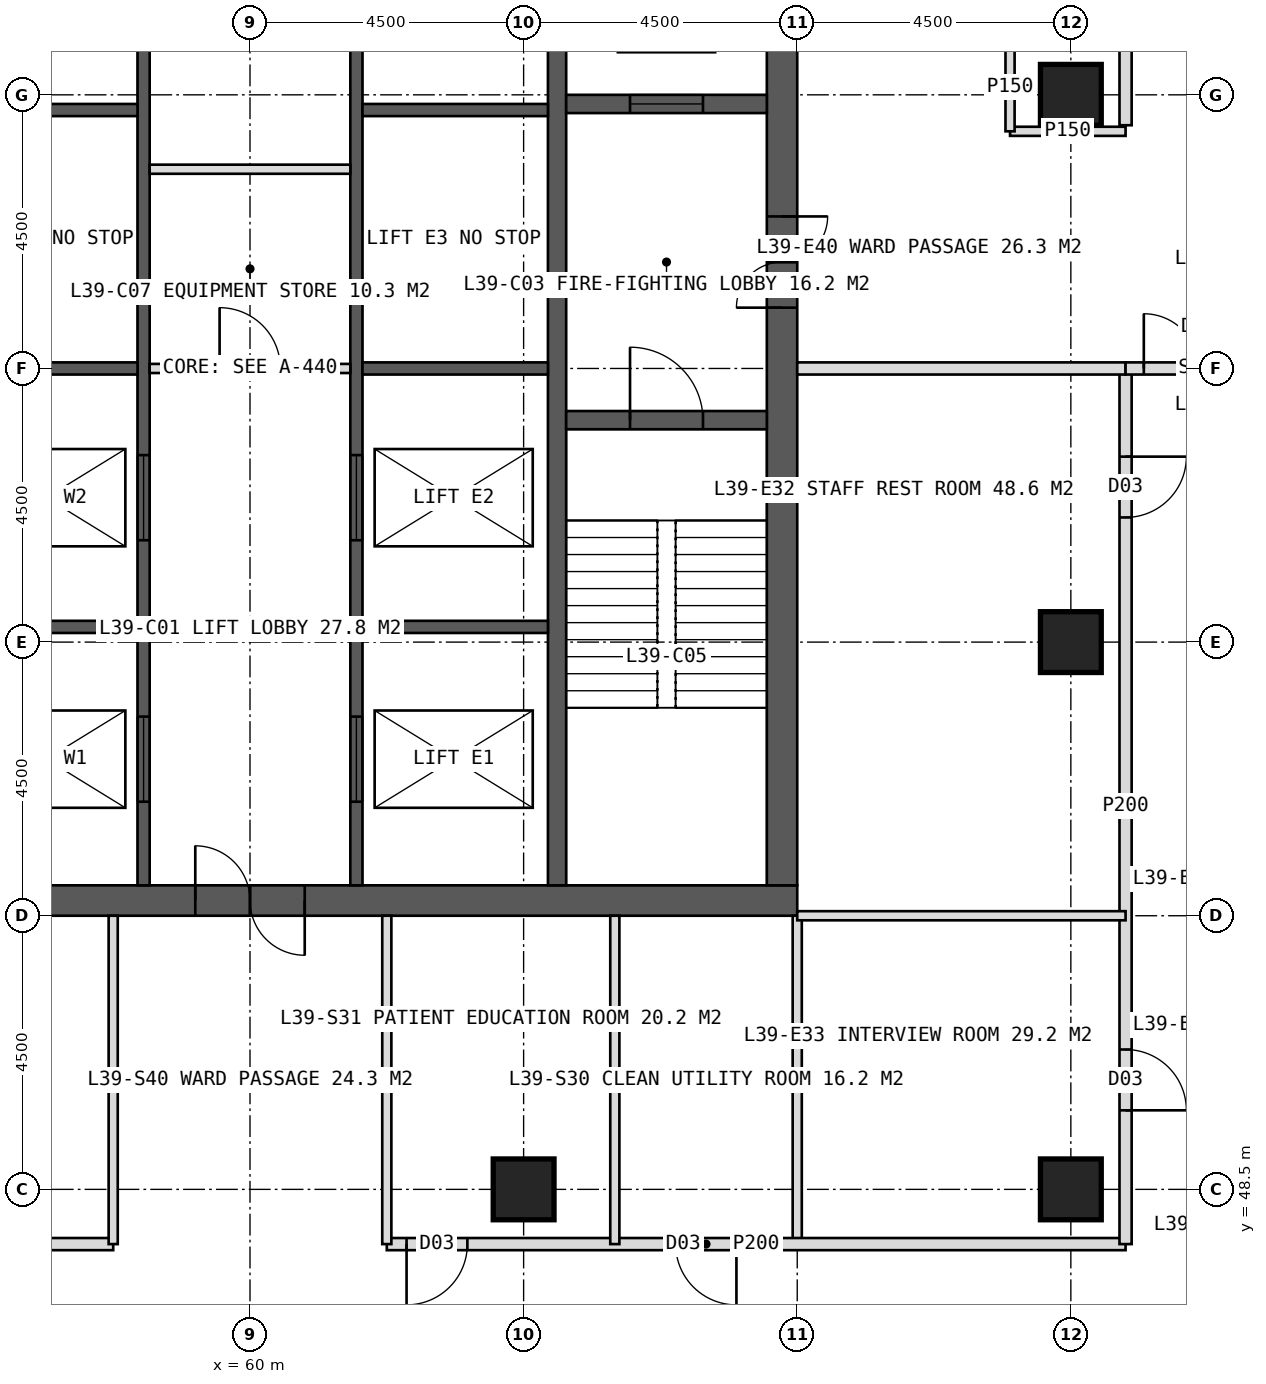
"""IFC4 building model, lengths in metres.
Left out: names, types, materials, properties, quantities, classifications, styles, units other than length and angle.
Written with IfcOpenShell. Run it as: python <this file> out.ifc"""

import sys

from ifc_helpers import new_model, si_unit, direction, frame, frame_2d, origin, origin_2d, place, context, subcontext, project, spatial, rectangle, hollow_rectangle, extrude, element, fill, save


model = new_model("IFC4")
c1 = context("Model", 3, precision=1e-05, world=origin(), true_north=direction((0.0, 1.0)))
c2 = subcontext(c1, "Body", "Model", "MODEL_VIEW")
j1 = project(units=[si_unit("LENGTHUNIT", "METRE"), si_unit("PLANEANGLEUNIT", "RADIAN")], contexts=[c1])
p1 = place(None, origin())
s1 = spatial("IfcSite", under=j1, at=p1, CompositionType="ELEMENT")
p2 = place(p1, origin())
s2 = spatial("IfcBuilding", under=s1, at=p2, CompositionType="ELEMENT")
p3 = place(p2, frame((0.0, 0.0, 164.0)))
s3 = spatial("IfcBuildingStorey", under=s2, at=p3, CompositionType="ELEMENT", Elevation=164.0)
p4 = place(p3, frame((51.0, 53.25, 0.0), z_axis=(0.0, 0.0, 1.0), x_axis=(1.0, 0.0, 0.0)))
e1 = element("IfcWall", 1, at=p4, inside=s3, PredefinedType="SHEAR", context=c2, shape_type="SweptSolid", body=[
    extrude(rectangle(XDim=18.0, YDim=0.5, at=frame_2d((9.0, 0.0))), origin(), (0.0, 0.0, 1.0), 4.0),
])
p5 = place(p4, frame((8.1, 0.0, 0.0)))
e2 = element("IfcOpeningElement", 2, at=p5, cuts=e1, PredefinedType="OPENING", context=c2, shape_type="SweptSolid", body=[
    extrude(rectangle(XDim=1.8, YDim=2.2, at=frame_2d((0.9, 1.1))), frame((0.0, 0.26, 0.0), z_axis=(0.0, -1.0, 0.0), x_axis=(1.0, 0.0, 0.0)), (0.0, 0.0, 1.0), 0.52),
])
p6 = place(p3, frame((68.75, 53.5, 0.0), z_axis=(0.0, 0.0, 1.0), x_axis=(0.0, 1.0, 0.0)))
e3 = element("IfcWall", 3, at=p6, inside=s3, PredefinedType="SHEAR", context=c2, shape_type="SweptSolid", body=[
    extrude(rectangle(XDim=17.0, YDim=0.5, at=frame_2d((8.5, 0.0))), origin(), (0.0, 0.0, 1.0), 4.0),
])
p7 = place(p6, frame((9.5, 0.0, 0.0)))
e4 = element("IfcOpeningElement", 4, at=p7, cuts=e3, PredefinedType="OPENING", context=c2, shape_type="SweptSolid", body=[
    extrude(rectangle(XDim=1.5, YDim=2.2, at=frame_2d((0.75, 1.1))), frame((0.0, 0.26, 0.0), z_axis=(0.0, -1.0, 0.0), x_axis=(1.0, 0.0, 0.0)), (0.0, 0.0, 1.0), 0.52),
])
p8 = place(p3, frame((65.05, 53.5, 0.0), z_axis=(0.0, 0.0, 1.0), x_axis=(0.0, 1.0, 0.0)))
e5 = element("IfcWall", 5, at=p8, inside=s3, PredefinedType="SHEAR", context=c2, shape_type="SweptSolid", body=[
    extrude(rectangle(XDim=17.0, YDim=0.3, at=frame_2d((8.5, 0.0))), origin(), (0.0, 0.0, 1.0), 4.0),
])
p9 = place(p3, frame((58.25, 53.5, 0.0), z_axis=(0.0, 0.0, 1.0), x_axis=(0.0, 1.0, 0.0)))
e6 = element("IfcWall", 6, at=p9, inside=s3, PredefinedType="SHEAR", context=c2, shape_type="SweptSolid", body=[
    extrude(rectangle(XDim=17.0, YDim=0.2, at=frame_2d((8.5, 0.0))), origin(), (0.0, 0.0, 1.0), 4.0),
])
p10 = place(p9, frame((1.375, 0.0, 0.0)))
e7 = element("IfcOpeningElement", 7, at=p10, cuts=e6, PredefinedType="OPENING", context=c2, shape_type="SweptSolid", body=[
    extrude(rectangle(XDim=1.4, YDim=2.2, at=frame_2d((0.7, 1.1))), frame((0.0, 0.11, 0.0), z_axis=(0.0, -1.0, 0.0), x_axis=(1.0, 0.0, 0.0)), (0.0, 0.0, 1.0), 0.22),
])
p11 = place(p9, frame((5.675, 0.0, 0.0)))
e8 = element("IfcOpeningElement", 8, at=p11, cuts=e6, PredefinedType="OPENING", context=c2, shape_type="SweptSolid", body=[
    extrude(rectangle(XDim=1.4, YDim=2.2, at=frame_2d((0.7, 1.1))), frame((0.0, 0.11, 0.0), z_axis=(0.0, -1.0, 0.0), x_axis=(1.0, 0.0, 0.0)), (0.0, 0.0, 1.0), 0.22),
])
p12 = place(p3, frame((61.75, 53.5, 0.0), z_axis=(0.0, 0.0, 1.0), x_axis=(0.0, 1.0, 0.0)))
e9 = element("IfcWall", 9, at=p12, inside=s3, PredefinedType="SHEAR", context=c2, shape_type="SweptSolid", body=[
    extrude(rectangle(XDim=17.0, YDim=0.2, at=frame_2d((8.5, 0.0))), origin(), (0.0, 0.0, 1.0), 4.0),
])
p13 = place(p12, frame((1.375, 0.0, 0.0)))
e10 = element("IfcOpeningElement", 10, at=p13, cuts=e9, PredefinedType="OPENING", context=c2, shape_type="SweptSolid", body=[
    extrude(rectangle(XDim=1.4, YDim=2.2, at=frame_2d((0.7, 1.1))), frame((0.0, 0.11, 0.0), z_axis=(0.0, -1.0, 0.0), x_axis=(1.0, 0.0, 0.0)), (0.0, 0.0, 1.0), 0.22),
])
p14 = place(p12, frame((5.675, 0.0, 0.0)))
e11 = element("IfcOpeningElement", 11, at=p14, cuts=e9, PredefinedType="OPENING", context=c2, shape_type="SweptSolid", body=[
    extrude(rectangle(XDim=1.4, YDim=2.2, at=frame_2d((0.7, 1.1))), frame((0.0, 0.11, 0.0), z_axis=(0.0, -1.0, 0.0), x_axis=(1.0, 0.0, 0.0)), (0.0, 0.0, 1.0), 0.22),
])
for number, where, z_axis, x_axis in (
    (12, (55.1, 57.75, 0.0), (0.0, 0.0, 1.0), (1.0, 0.0, 0.0)),
    (13, (61.85, 57.75, 0.0), (0.0, 0.0, 1.0), (1.0, 0.0, 0.0)),
    (14, (55.1, 62.0, 0.0), (0.0, 0.0, 1.0), (1.0, 0.0, 0.0)),
    (15, (61.85, 62.0, 0.0), (0.0, 0.0, 1.0), (1.0, 0.0, 0.0)),
    (16, (55.1, 66.25, 0.0), (0.0, 0.0, 1.0), (1.0, 0.0, 0.0)),
    (17, (61.85, 66.25, 0.0), (0.0, 0.0, 1.0), (1.0, 0.0, 0.0)),
):
    element("IfcWall", number, at=place(p3, frame(where, z_axis=z_axis, x_axis=x_axis)), inside=s3, PredefinedType="SHEAR", context=c2, shape_type="SweptSolid", body=[
        extrude(rectangle(XDim=3.05, YDim=0.2, at=frame_2d((1.525, 0.0))), origin(), (0.0, 0.0, 1.0), 4.0),
    ])
p15 = place(p3, frame((65.2, 61.15, 0.0), z_axis=(0.0, 0.0, 1.0), x_axis=(1.0, 0.0, 0.0)))
e18 = element("IfcWall", 18, at=p15, inside=s3, PredefinedType="SHEAR", context=c2, shape_type="SweptSolid", body=[
    extrude(rectangle(XDim=3.3, YDim=0.3, at=frame_2d((1.65, 0.0))), origin(), (0.0, 0.0, 1.0), 4.0),
])
p16 = place(p15, frame((1.05, 0.0, 0.0)))
e19 = element("IfcOpeningElement", 19, at=p16, cuts=e18, PredefinedType="OPENING", context=c2, shape_type="SweptSolid", body=[
    extrude(rectangle(XDim=1.2, YDim=2.1, at=frame_2d((0.6, 1.05))), frame((0.0, 0.16, 0.0), z_axis=(0.0, -1.0, 0.0), x_axis=(1.0, 0.0, 0.0)), (0.0, 0.0, 1.0), 0.32),
])
p17 = place(p3, frame((65.2, 66.35, 0.0), z_axis=(0.0, 0.0, 1.0), x_axis=(1.0, 0.0, 0.0)))
e20 = element("IfcWall", 20, at=p17, inside=s3, PredefinedType="SHEAR", context=c2, shape_type="SweptSolid", body=[
    extrude(rectangle(XDim=3.3, YDim=0.3, at=frame_2d((1.65, 0.0))), origin(), (0.0, 0.0, 1.0), 4.0),
])
p18 = place(p17, frame((1.05, 0.0, 0.0)))
e21 = element("IfcOpeningElement", 21, at=p18, cuts=e20, PredefinedType="OPENING", context=c2, shape_type="SweptSolid", body=[
    extrude(rectangle(XDim=1.2, YDim=2.2, at=frame_2d((0.6, 1.1))), frame((0.0, 0.16, 0.0), z_axis=(0.0, -1.0, 0.0), x_axis=(1.0, 0.0, 0.0)), (0.0, 0.0, 1.0), 0.32),
])
for number, where, z_axis, x_axis in (
    (22, (73.5, 48.5, 0.0), (0.0, 0.0, 1.0), (1.0, 0.0, 0.0)),
    (23, (64.5, 48.5, 0.0), (0.0, 0.0, 1.0), (1.0, 0.0, 0.0)),
    (24, (73.5, 57.5, 0.0), (0.0, 0.0, 1.0), (1.0, 0.0, 0.0)),
    (25, (73.5, 66.5, 0.0), (0.0, 0.0, 1.0), (1.0, 0.0, 0.0)),
):
    element("IfcColumn", number, at=place(p3, frame(where, z_axis=z_axis, x_axis=x_axis)), inside=s3, PredefinedType="COLUMN", context=c2, shape_type="SweptSolid", body=[
        extrude(hollow_rectangle(XDim=1.0, YDim=1.0, WallThickness=0.1, at=origin_2d()), origin(), (0.0, 0.0, 1.0), 4.0),
    ])
p19 = place(p3, frame((69.0, 53.0, 0.0), z_axis=(0.0, 0.0, 1.0), x_axis=(0.0, -1.0, 0.0)))
e26 = element("IfcWall", 26, at=p19, inside=s3, PredefinedType="PARTITIONING", context=c2, shape_type="SweptSolid", body=[
    extrude(rectangle(XDim=5.4, YDim=0.15, at=frame_2d((2.7, 0.0))), origin(), (0.0, 0.0, 1.0), 3.75),
])
p20 = place(p3, frame((74.4, 47.6, 0.0), z_axis=(0.0, 0.0, 1.0), x_axis=(-1.0, 0.0, 0.0)))
e27 = element("IfcWall", 27, at=p20, inside=s3, PredefinedType="PARTITIONING", context=c2, shape_type="SweptSolid", body=[
    extrude(rectangle(XDim=12.15, YDim=0.2, at=frame_2d((6.075, 0.0))), origin(), (0.0, 0.0, 1.0), 3.75),
])
p21 = place(p20, frame((6.4, 0.0, 0.0)))
e28 = element("IfcOpeningElement", 28, at=p21, cuts=e27, PredefinedType="OPENING", context=c2, shape_type="SweptSolid", body=[
    extrude(rectangle(XDim=1.0, YDim=2.1, at=frame_2d((0.5, 1.05))), frame((0.0, 0.11, 0.0), z_axis=(0.0, -1.0, 0.0), x_axis=(1.0, 0.0, 0.0)), (0.0, 0.0, 1.0), 0.22),
])
p22 = place(p20, frame((10.825, 0.0, 0.0)))
e29 = element("IfcOpeningElement", 29, at=p22, cuts=e27, PredefinedType="OPENING", context=c2, shape_type="SweptSolid", body=[
    extrude(rectangle(XDim=1.0, YDim=2.1, at=frame_2d((0.5, 1.05))), frame((0.0, 0.11, 0.0), z_axis=(0.0, -1.0, 0.0), x_axis=(1.0, 0.0, 0.0)), (0.0, 0.0, 1.0), 0.22),
])
p23 = place(p3, frame((57.75, 47.6, 0.0), z_axis=(0.0, 0.0, 1.0), x_axis=(-1.0, 0.0, 0.0)))
e30 = element("IfcWall", 30, at=p23, inside=s3, PredefinedType="PARTITIONING", context=c2, shape_type="SweptSolid", body=[
    extrude(rectangle(XDim=12.15, YDim=0.2, at=frame_2d((6.075, 0.0))), origin(), (0.0, 0.0, 1.0), 3.75),
])
p24 = place(p23, frame((4.3, 0.0, 0.0)))
e31 = element("IfcOpeningElement", 31, at=p24, cuts=e30, PredefinedType="OPENING", context=c2, shape_type="SweptSolid", body=[
    extrude(rectangle(XDim=1.0, YDim=2.1, at=frame_2d((0.5, 1.05))), frame((0.0, 0.11, 0.0), z_axis=(0.0, -1.0, 0.0), x_axis=(1.0, 0.0, 0.0)), (0.0, 0.0, 1.0), 0.22),
])
p25 = place(p23, frame((8.95, 0.0, 0.0)))
e32 = element("IfcOpeningElement", 32, at=p25, cuts=e30, PredefinedType="OPENING", context=c2, shape_type="SweptSolid", body=[
    extrude(rectangle(XDim=1.0, YDim=2.1, at=frame_2d((0.5, 1.05))), frame((0.0, 0.11, 0.0), z_axis=(0.0, -1.0, 0.0), x_axis=(1.0, 0.0, 0.0)), (0.0, 0.0, 1.0), 0.22),
])
for number, where, z_axis, x_axis in (
    (33, (62.25, 53.0, 0.0), (0.0, 0.0, 1.0), (0.0, -1.0, 0.0)),
    (34, (57.75, 53.0, 0.0), (0.0, 0.0, 1.0), (0.0, -1.0, 0.0)),
    (35, (66.0, 53.0, 0.0), (0.0, 0.0, 1.0), (0.0, -1.0, 0.0)),
):
    element("IfcWall", number, at=place(p3, frame(where, z_axis=z_axis, x_axis=x_axis)), inside=s3, PredefinedType="PARTITIONING", context=c2, shape_type="SweptSolid", body=[
        extrude(rectangle(XDim=5.4, YDim=0.15, at=frame_2d((2.7, 0.0))), origin(), (0.0, 0.0, 1.0), 3.75),
    ])
p26 = place(p3, frame((74.4, 76.4, 0.0), z_axis=(0.0, 0.0, 1.0), x_axis=(0.0, -1.0, 0.0)))
e36 = element("IfcWall", 36, at=p26, inside=s3, PredefinedType="PARTITIONING", context=c2, shape_type="SweptSolid", body=[
    extrude(rectangle(XDim=10.4, YDim=0.2, at=frame_2d((5.2, 0.0))), origin(), (0.0, 0.0, 1.0), 3.75),
])
p27 = place(p26, frame((1.35, 0.0, 0.0)))
e37 = element("IfcOpeningElement", 37, at=p27, cuts=e36, PredefinedType="OPENING", context=c2, shape_type="SweptSolid", body=[
    extrude(rectangle(XDim=1.0, YDim=2.1, at=frame_2d((0.5, 1.05))), frame((0.0, 0.11, 0.0), z_axis=(0.0, -1.0, 0.0), x_axis=(1.0, 0.0, 0.0)), (0.0, 0.0, 1.0), 0.22),
])
p28 = place(p26, frame((8.15, 0.0, 0.0)))
e38 = element("IfcOpeningElement", 38, at=p28, cuts=e36, PredefinedType="OPENING", context=c2, shape_type="SweptSolid", body=[
    extrude(rectangle(XDim=0.9, YDim=2.1, at=frame_2d((0.45, 1.05))), frame((0.0, 0.11, 0.0), z_axis=(0.0, -1.0, 0.0), x_axis=(1.0, 0.0, 0.0)), (0.0, 0.0, 1.0), 0.22),
])
p29 = place(p3, frame((74.4, 62.0, 0.0), z_axis=(0.0, 0.0, 1.0), x_axis=(0.0, -1.0, 0.0)))
e39 = element("IfcWall", 39, at=p29, inside=s3, PredefinedType="PARTITIONING", context=c2, shape_type="SweptSolid", body=[
    extrude(rectangle(XDim=14.4, YDim=0.2, at=frame_2d((7.2, 0.0))), origin(), (0.0, 0.0, 1.0), 3.75),
])
p30 = place(p29, frame((1.45, 0.0, 0.0)))
e40 = element("IfcOpeningElement", 40, at=p30, cuts=e39, PredefinedType="OPENING", context=c2, shape_type="SweptSolid", body=[
    extrude(rectangle(XDim=1.0, YDim=2.1, at=frame_2d((0.5, 1.05))), frame((0.0, 0.11, 0.0), z_axis=(0.0, -1.0, 0.0), x_axis=(1.0, 0.0, 0.0)), (0.0, 0.0, 1.0), 0.22),
])
p31 = place(p29, frame((11.2, 0.0, 0.0)))
e41 = element("IfcOpeningElement", 41, at=p31, cuts=e39, PredefinedType="OPENING", context=c2, shape_type="SweptSolid", body=[
    extrude(rectangle(XDim=1.0, YDim=2.1, at=frame_2d((0.5, 1.05))), frame((0.0, 0.11, 0.0), z_axis=(0.0, -1.0, 0.0), x_axis=(1.0, 0.0, 0.0)), (0.0, 0.0, 1.0), 0.22),
])
p32 = place(p3, frame((72.5, 65.9, 0.0), z_axis=(0.0, 0.0, 1.0), x_axis=(1.0, 0.0, 0.0)))
e42 = element("IfcWall", 42, at=p32, inside=s3, PredefinedType="PARTITIONING", context=c2, shape_type="SweptSolid", body=[
    extrude(rectangle(XDim=1.9, YDim=0.15, at=frame_2d((0.95, 0.0))), origin(), (0.0, 0.0, 1.0), 3.75),
])
p33 = place(p3, frame((69.0, 62.0, 0.0), z_axis=(0.0, 0.0, 1.0), x_axis=(1.0, 0.0, 0.0)))
e43 = element("IfcWall", 43, at=p33, inside=s3, PredefinedType="SOLIDWALL", context=c2, shape_type="SweptSolid", body=[
    extrude(rectangle(XDim=5.4, YDim=0.2, at=frame_2d((2.7, 0.0))), origin(), (0.0, 0.0, 1.0), 2.95),
])
p34 = place(p3, frame((69.0, 53.0, 0.0), z_axis=(0.0, 0.0, 1.0), x_axis=(1.0, 0.0, 0.0)))
e44 = element("IfcWall", 44, at=p34, inside=s3, PredefinedType="PARTITIONING", context=c2, shape_type="SweptSolid", body=[
    extrude(rectangle(XDim=5.4, YDim=0.15, at=frame_2d((2.7, 0.0))), origin(), (0.0, 0.0, 1.0), 3.75),
])
p35 = place(p3, frame((74.4, 62.0, 0.0), z_axis=(0.0, 0.0, 1.0), x_axis=(1.0, 0.0, 0.0)))
e45 = element("IfcWall", 45, at=p35, inside=s3, PredefinedType="SOLIDWALL", context=c2, shape_type="SweptSolid", body=[
    extrude(rectangle(XDim=2.7, YDim=0.2, at=frame_2d((1.35, 0.0))), origin(), (0.0, 0.0, 1.0), 2.95),
])
p36 = place(p35, frame((0.3, 0.0, 0.0)))
e46 = element("IfcOpeningElement", 46, at=p36, cuts=e45, PredefinedType="OPENING", context=c2, shape_type="SweptSolid", body=[
    extrude(rectangle(XDim=1.8, YDim=2.2, at=frame_2d((0.9, 1.1))), frame((0.0, 0.11, 0.0), z_axis=(0.0, -1.0, 0.0), x_axis=(1.0, 0.0, 0.0)), (0.0, 0.0, 1.0), 0.22),
])
p37 = place(p3, frame((58.35, 62.0, 0.0), z_axis=(0.0, 0.0, 1.0), x_axis=(1.0, 0.0, 0.0)))
e47 = element("IfcWall", 47, at=p37, inside=s3, PredefinedType="PARTITIONING", context=c2, shape_type="SweptSolid", body=[
    extrude(rectangle(XDim=3.3, YDim=0.15, at=frame_2d((1.65, 0.0))), origin(), (0.0, 0.0, 1.0), 3.75),
])
p38 = place(p37, frame((1.15, 0.0, 0.0)))
e48 = element("IfcOpeningElement", 48, at=p38, cuts=e47, PredefinedType="OPENING", context=c2, shape_type="SweptSolid", body=[
    extrude(rectangle(XDim=1.0, YDim=2.1, at=frame_2d((0.5, 1.05))), frame((0.0, 0.085, 0.0), z_axis=(0.0, -1.0, 0.0), x_axis=(1.0, 0.0, 0.0)), (0.0, 0.0, 1.0), 0.17),
])
p39 = place(p3, frame((58.35, 65.277, 0.0), z_axis=(0.0, 0.0, 1.0), x_axis=(1.0, 0.0, 0.0)))
e49 = element("IfcWall", 49, at=p39, inside=s3, PredefinedType="PARTITIONING", context=c2, shape_type="SweptSolid", body=[
    extrude(rectangle(XDim=3.3, YDim=0.15, at=frame_2d((1.65, 0.0))), origin(), (0.0, 0.0, 1.0), 3.75),
])
p40 = place(p3, frame((72.5, 65.9, 0.0), z_axis=(0.0, 0.0, 1.0), x_axis=(0.0, 1.0, 0.0)))
e50 = element("IfcWall", 50, at=p40, inside=s3, PredefinedType="PARTITIONING", context=c2, shape_type="SweptSolid", body=[
    extrude(rectangle(XDim=1.45, YDim=0.15, at=frame_2d((0.725, 0.0))), origin(), (0.0, 0.0, 1.0), 3.75),
])
p41 = place(p21, origin())
e51 = element("IfcDoor", 51, at=p41, inside=s3, OperationType="SINGLE_SWING_LEFT", PredefinedType="DOOR", context=c2, shape_type="SweptSolid", body=[
    extrude(rectangle(XDim=1.0, YDim=2.1, at=frame_2d((0.5, 1.05))), frame((0.0, 0.025, 0.0), z_axis=(0.0, -1.0, 0.0), x_axis=(1.0, 0.0, 0.0)), (0.0, 0.0, 1.0), 0.05),
])
fill(e28, e51)
p42 = place(p22, origin())
e52 = element("IfcDoor", 52, at=p42, inside=s3, OperationType="SINGLE_SWING_RIGHT", PredefinedType="DOOR", context=c2, shape_type="SweptSolid", body=[
    extrude(rectangle(XDim=1.0, YDim=2.1, at=frame_2d((0.5, 1.05))), frame((0.0, 0.025, 0.0), z_axis=(0.0, -1.0, 0.0), x_axis=(1.0, 0.0, 0.0)), (0.0, 0.0, 1.0), 0.05),
])
fill(e29, e52)
p43 = place(p30, origin())
e53 = element("IfcDoor", 53, at=p43, inside=s3, OperationType="SINGLE_SWING_LEFT", PredefinedType="DOOR", context=c2, shape_type="SweptSolid", body=[
    extrude(rectangle(XDim=1.0, YDim=2.1, at=frame_2d((0.5, 1.05))), frame((0.0, 0.025, 0.0), z_axis=(0.0, -1.0, 0.0), x_axis=(1.0, 0.0, 0.0)), (0.0, 0.0, 1.0), 0.05),
])
fill(e40, e53)
p44 = place(p31, origin())
e54 = element("IfcDoor", 54, at=p44, inside=s3, OperationType="SINGLE_SWING_RIGHT", PredefinedType="DOOR", context=c2, shape_type="SweptSolid", body=[
    extrude(rectangle(XDim=1.0, YDim=2.1, at=frame_2d((0.5, 1.05))), frame((0.0, 0.025, 0.0), z_axis=(0.0, -1.0, 0.0), x_axis=(1.0, 0.0, 0.0)), (0.0, 0.0, 1.0), 0.05),
])
fill(e41, e54)
p45 = place(p36, origin())
e55 = element("IfcDoor", 55, at=p45, inside=s3, OperationType="DOUBLE_DOOR_DOUBLE_SWING", PredefinedType="DOOR", context=c2, shape_type="SweptSolid", body=[
    extrude(rectangle(XDim=1.8, YDim=2.2, at=frame_2d((0.9, 1.1))), frame((0.0, 0.025, 0.0), z_axis=(0.0, -1.0, 0.0), x_axis=(1.0, 0.0, 0.0)), (0.0, 0.0, 1.0), 0.05),
])
fill(e46, e55)
p46 = place(p5, origin())
e56 = element("IfcDoor", 56, at=p46, inside=s3, OperationType="DOUBLE_DOOR_SINGLE_SWING", PredefinedType="DOOR", context=c2, shape_type="SweptSolid", body=[
    extrude(rectangle(XDim=1.8, YDim=2.2, at=frame_2d((0.9, 1.1))), frame((0.0, 0.025, 0.0), z_axis=(0.0, -1.0, 0.0), x_axis=(1.0, 0.0, 0.0)), (0.0, 0.0, 1.0), 0.05),
])
fill(e2, e56)
p47 = place(p7, origin())
e57 = element("IfcDoor", 57, at=p47, inside=s3, OperationType="DOUBLE_DOOR_SINGLE_SWING", PredefinedType="DOOR", context=c2, shape_type="SweptSolid", body=[
    extrude(rectangle(XDim=1.5, YDim=2.2, at=frame_2d((0.75, 1.1))), frame((0.0, 0.025, 0.0), z_axis=(0.0, -1.0, 0.0), x_axis=(1.0, 0.0, 0.0)), (0.0, 0.0, 1.0), 0.05),
])
fill(e4, e57)
p48 = place(p16, origin())
e58 = element("IfcDoor", 58, at=p48, inside=s3, OperationType="SINGLE_SWING_LEFT", PredefinedType="DOOR", context=c2, shape_type="SweptSolid", body=[
    extrude(rectangle(XDim=1.2, YDim=2.1, at=frame_2d((0.6, 1.05))), frame((0.0, 0.025, 0.0), z_axis=(0.0, -1.0, 0.0), x_axis=(1.0, 0.0, 0.0)), (0.0, 0.0, 1.0), 0.05),
])
fill(e19, e58)
p49 = place(p18, origin())
e59 = element("IfcDoor", 59, at=p49, inside=s3, OperationType="SLIDING_TO_LEFT", PredefinedType="DOOR", context=c2, shape_type="SweptSolid", body=[
    extrude(rectangle(XDim=1.2, YDim=2.2, at=frame_2d((0.6, 1.1))), frame((0.0, 0.025, 0.0), z_axis=(0.0, -1.0, 0.0), x_axis=(1.0, 0.0, 0.0)), (0.0, 0.0, 1.0), 0.05),
])
fill(e21, e59)
p50 = place(p10, origin())
e60 = element("IfcDoor", 60, at=p50, inside=s3, OperationType="SLIDING_TO_LEFT", PredefinedType="DOOR", context=c2, shape_type="SweptSolid", body=[
    extrude(rectangle(XDim=1.4, YDim=2.2, at=frame_2d((0.7, 1.1))), frame((0.0, 0.025, 0.0), z_axis=(0.0, -1.0, 0.0), x_axis=(1.0, 0.0, 0.0)), (0.0, 0.0, 1.0), 0.05),
])
fill(e7, e60)
p51 = place(p13, origin())
e61 = element("IfcDoor", 61, at=p51, inside=s3, OperationType="SLIDING_TO_LEFT", PredefinedType="DOOR", context=c2, shape_type="SweptSolid", body=[
    extrude(rectangle(XDim=1.4, YDim=2.2, at=frame_2d((0.7, 1.1))), frame((0.0, 0.025, 0.0), z_axis=(0.0, -1.0, 0.0), x_axis=(1.0, 0.0, 0.0)), (0.0, 0.0, 1.0), 0.05),
])
fill(e10, e61)
p52 = place(p11, origin())
e62 = element("IfcDoor", 62, at=p52, inside=s3, OperationType="SLIDING_TO_LEFT", PredefinedType="DOOR", context=c2, shape_type="SweptSolid", body=[
    extrude(rectangle(XDim=1.4, YDim=2.2, at=frame_2d((0.7, 1.1))), frame((0.0, 0.025, 0.0), z_axis=(0.0, -1.0, 0.0), x_axis=(1.0, 0.0, 0.0)), (0.0, 0.0, 1.0), 0.05),
])
fill(e8, e62)
p53 = place(p14, origin())
e63 = element("IfcDoor", 63, at=p53, inside=s3, OperationType="SLIDING_TO_LEFT", PredefinedType="DOOR", context=c2, shape_type="SweptSolid", body=[
    extrude(rectangle(XDim=1.4, YDim=2.2, at=frame_2d((0.7, 1.1))), frame((0.0, 0.025, 0.0), z_axis=(0.0, -1.0, 0.0), x_axis=(1.0, 0.0, 0.0)), (0.0, 0.0, 1.0), 0.05),
])
fill(e11, e63)
p54 = place(p38, origin())
e64 = element("IfcDoor", 64, at=p54, inside=s3, OperationType="SINGLE_SWING_LEFT", PredefinedType="DOOR", context=c2, shape_type="SweptSolid", body=[
    extrude(rectangle(XDim=1.0, YDim=2.1, at=frame_2d((0.5, 1.05))), frame((0.0, 0.025, 0.0), z_axis=(0.0, -1.0, 0.0), x_axis=(1.0, 0.0, 0.0)), (0.0, 0.0, 1.0), 0.05),
])
fill(e48, e64)
save(model, sys.argv[1])
